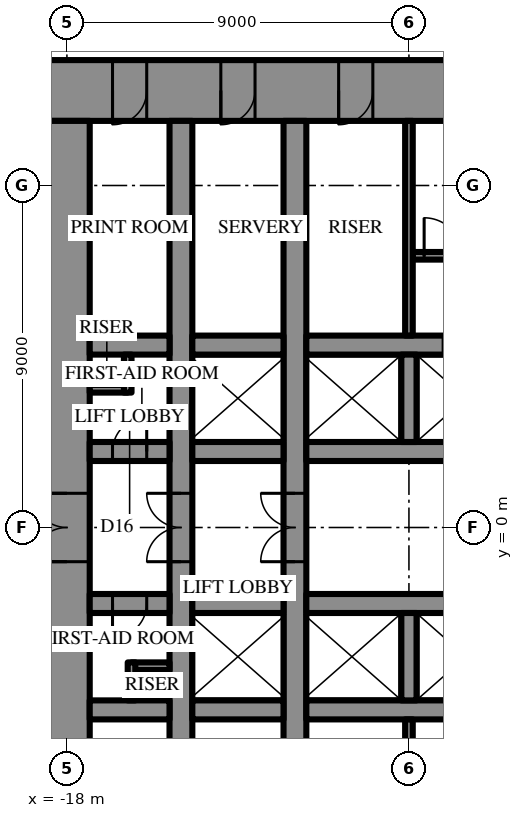
"""IFC4 building model, lengths in metres.
Left out: names, types, materials, properties, quantities, classifications, styles, units other than length and angle.
Written with IfcOpenShell. Run it as: python <this file> out.ifc"""

import sys

from ifc_helpers import new_model, si_unit, direction, frame, frame_2d, origin, place, context, subcontext, project, spatial, rectangle, extrude, element, fill, save


model = new_model("IFC4")
c1 = context("Model", 3, precision=1e-05, world=origin(), true_north=direction((0.0, 1.0)))
c2 = subcontext(c1, "Body", "Model", "MODEL_VIEW")
j1 = project(units=[si_unit("LENGTHUNIT", "METRE"), si_unit("PLANEANGLEUNIT", "RADIAN")], contexts=[c1])
p1 = place(None, origin())
s1 = spatial("IfcSite", under=j1, at=p1, CompositionType="ELEMENT")
p2 = place(p1, origin())
s2 = spatial("IfcBuilding", under=s1, at=p2, CompositionType="ELEMENT")
p3 = place(p2, frame((0.0, 0.0, 157.3)))
s3 = spatial("IfcBuildingStorey", under=s2, at=p3, CompositionType="ELEMENT", Elevation=157.3)
p4 = place(p3, frame((-18.6, 11.5, 0.0), z_axis=(0.0, 0.0, 1.0), x_axis=(1.0, 0.0, 0.0)))
e1 = element("IfcWall", 1, at=p4, inside=s3, PredefinedType="SHEAR", context=c2, shape_type="SweptSolid", body=[
    extrude(rectangle(XDim=37.2, YDim=1.6, at=frame_2d((18.6, 0.0))), origin(), (0.0, 0.0, 1.0), 4.2),
])
p5 = place(p4, frame((19.45, 0.0, 0.0)))
e2 = element("IfcOpeningElement", 2, at=p5, cuts=e1, PredefinedType="OPENING", context=c2, shape_type="SweptSolid", body=[
    extrude(rectangle(XDim=0.9, YDim=2.2, at=frame_2d((0.45, 1.1))), frame((0.0, 0.81, 0.0), z_axis=(0.0, -1.0, 0.0), x_axis=(1.0, 0.0, 0.0)), (0.0, 0.0, 1.0), 1.62),
])
p6 = place(p4, frame((22.45, 0.0, 0.0)))
e3 = element("IfcOpeningElement", 3, at=p6, cuts=e1, PredefinedType="OPENING", context=c2, shape_type="SweptSolid", body=[
    extrude(rectangle(XDim=0.9, YDim=2.2, at=frame_2d((0.45, 1.1))), frame((0.0, 0.81, 0.0), z_axis=(0.0, -1.0, 0.0), x_axis=(1.0, 0.0, 0.0)), (0.0, 0.0, 1.0), 1.62),
])
p7 = place(p4, frame((25.5, 0.0, 0.0)))
e4 = element("IfcOpeningElement", 4, at=p7, cuts=e1, PredefinedType="OPENING", context=c2, shape_type="SweptSolid", body=[
    extrude(rectangle(XDim=1.0, YDim=2.2, at=frame_2d((0.5, 1.1))), frame((0.0, 0.81, 0.0), z_axis=(0.0, -1.0, 0.0), x_axis=(1.0, 0.0, 0.0)), (0.0, 0.0, 1.0), 1.62),
])
p8 = place(p4, frame((1.8, 0.0, 0.0)))
e5 = element("IfcOpeningElement", 5, at=p8, cuts=e1, PredefinedType="OPENING", context=c2, shape_type="SweptSolid", body=[
    extrude(rectangle(XDim=0.9, YDim=2.2, at=frame_2d((0.45, 1.1))), frame((0.0, 0.81, 0.0), z_axis=(0.0, -1.0, 0.0), x_axis=(1.0, 0.0, 0.0)), (0.0, 0.0, 1.0), 1.62),
])
p9 = place(p4, frame((4.65, 0.0, 0.0)))
e6 = element("IfcOpeningElement", 6, at=p9, cuts=e1, PredefinedType="OPENING", context=c2, shape_type="SweptSolid", body=[
    extrude(rectangle(XDim=0.9, YDim=2.2, at=frame_2d((0.45, 1.1))), frame((0.0, 0.81, 0.0), z_axis=(0.0, -1.0, 0.0), x_axis=(1.0, 0.0, 0.0)), (0.0, 0.0, 1.0), 1.62),
])
p10 = place(p4, frame((7.75, 0.0, 0.0)))
e7 = element("IfcOpeningElement", 7, at=p10, cuts=e1, PredefinedType="OPENING", context=c2, shape_type="SweptSolid", body=[
    extrude(rectangle(XDim=0.9, YDim=2.2, at=frame_2d((0.45, 1.1))), frame((0.0, 0.81, 0.0), z_axis=(0.0, -1.0, 0.0), x_axis=(1.0, 0.0, 0.0)), (0.0, 0.0, 1.0), 1.62),
])
p11 = place(p4, frame((28.55, 0.0, 0.0)))
e8 = element("IfcOpeningElement", 8, at=p11, cuts=e1, PredefinedType="OPENING", context=c2, shape_type="SweptSolid", body=[
    extrude(rectangle(XDim=0.9, YDim=2.2, at=frame_2d((0.45, 1.1))), frame((0.0, 0.81, 0.0), z_axis=(0.0, -1.0, 0.0), x_axis=(1.0, 0.0, 0.0)), (0.0, 0.0, 1.0), 1.62),
])
p12 = place(p4, frame((31.65, 0.0, 0.0)))
e9 = element("IfcOpeningElement", 9, at=p12, cuts=e1, PredefinedType="OPENING", context=c2, shape_type="SweptSolid", body=[
    extrude(rectangle(XDim=0.9, YDim=2.2, at=frame_2d((0.45, 1.1))), frame((0.0, 0.81, 0.0), z_axis=(0.0, -1.0, 0.0), x_axis=(1.0, 0.0, 0.0)), (0.0, 0.0, 1.0), 1.62),
])
p13 = place(p4, frame((34.5, 0.0, 0.0)))
e10 = element("IfcOpeningElement", 10, at=p13, cuts=e1, PredefinedType="OPENING", context=c2, shape_type="SweptSolid", body=[
    extrude(rectangle(XDim=0.9, YDim=2.2, at=frame_2d((0.45, 1.1))), frame((0.0, 0.81, 0.0), z_axis=(0.0, -1.0, 0.0), x_axis=(1.0, 0.0, 0.0)), (0.0, 0.0, 1.0), 1.62),
])
p14 = place(p3, frame((-18.0, 10.7, 0.0), z_axis=(0.0, 0.0, 1.0), x_axis=(0.0, -1.0, 0.0)))
e11 = element("IfcWall", 11, at=p14, inside=s3, PredefinedType="SHEAR", context=c2, shape_type="SweptSolid", body=[
    extrude(rectangle(XDim=21.4, YDim=1.2, at=frame_2d((10.7, 0.0))), origin(), (0.0, 0.0, 1.0), 4.2),
])
p15 = place(p14, frame((9.8, 0.0, 0.0)))
e12 = element("IfcOpeningElement", 12, at=p15, cuts=e11, PredefinedType="OPENING", context=c2, shape_type="SweptSolid", body=[
    extrude(rectangle(XDim=1.8, YDim=2.4, at=frame_2d((0.9, 1.2))), frame((0.0, 0.61, 0.0), z_axis=(0.0, -1.0, 0.0), x_axis=(1.0, 0.0, 0.0)), (0.0, 0.0, 1.0), 1.22),
])
p16 = place(p3, frame((-12.0, -10.7, 0.0), z_axis=(0.0, 0.0, 1.0), x_axis=(0.0, 1.0, 0.0)))
e13 = element("IfcWall", 13, at=p16, inside=s3, PredefinedType="SHEAR", context=c2, shape_type="SweptSolid", body=[
    extrude(rectangle(XDim=21.4, YDim=0.6, at=frame_2d((10.7, 0.0))), origin(), (0.0, 0.0, 1.0), 4.2),
])
p17 = place(p16, frame((9.8, 0.0, 0.0)))
e14 = element("IfcOpeningElement", 14, at=p17, cuts=e13, PredefinedType="OPENING", context=c2, shape_type="SweptSolid", body=[
    extrude(rectangle(XDim=1.8, YDim=2.4, at=frame_2d((0.9, 1.2))), frame((0.0, 0.31, 0.0), z_axis=(0.0, -1.0, 0.0), x_axis=(1.0, 0.0, 0.0)), (0.0, 0.0, 1.0), 0.62),
])
p18 = place(p3, frame((-15.0, -10.7, 0.0), z_axis=(0.0, 0.0, 1.0), x_axis=(0.0, 1.0, 0.0)))
e15 = element("IfcWall", 15, at=p18, inside=s3, PredefinedType="SHEAR", context=c2, shape_type="SweptSolid", body=[
    extrude(rectangle(XDim=21.4, YDim=0.6, at=frame_2d((10.7, 0.0))), origin(), (0.0, 0.0, 1.0), 4.2),
])
p19 = place(p18, frame((9.8, 0.0, 0.0)))
e16 = element("IfcOpeningElement", 16, at=p19, cuts=e15, PredefinedType="OPENING", context=c2, shape_type="SweptSolid", body=[
    extrude(rectangle(XDim=1.8, YDim=2.4, at=frame_2d((0.9, 1.2))), frame((0.0, 0.31, 0.0), z_axis=(0.0, -1.0, 0.0), x_axis=(1.0, 0.0, 0.0)), (0.0, 0.0, 1.0), 0.62),
])
p20 = place(p3, frame((-17.4, 2.0, 0.0), z_axis=(0.0, 0.0, 1.0), x_axis=(1.0, 0.0, 0.0)))
e17 = element("IfcWall", 17, at=p20, inside=s3, PredefinedType="SHEAR", context=c2, shape_type="SweptSolid", body=[
    extrude(rectangle(XDim=2.1, YDim=0.5, at=frame_2d((1.05, 0.0))), origin(), (0.0, 0.0, 1.0), 4.2),
])
p21 = place(p20, frame((0.6, 0.0, 0.0)))
e18 = element("IfcOpeningElement", 18, at=p21, cuts=e17, PredefinedType="OPENING", context=c2, shape_type="SweptSolid", body=[
    extrude(rectangle(XDim=0.9, YDim=2.2, at=frame_2d((0.45, 1.1))), frame((0.0, 0.26, 0.0), z_axis=(0.0, -1.0, 0.0), x_axis=(1.0, 0.0, 0.0)), (0.0, 0.0, 1.0), 0.52),
])
p22 = place(p3, frame((-14.7, 2.0, 0.0), z_axis=(0.0, 0.0, 1.0), x_axis=(1.0, 0.0, 0.0)))
e19 = element("IfcWall", 19, at=p22, inside=s3, PredefinedType="SHEAR", context=c2, shape_type="SweptSolid", body=[
    extrude(rectangle(XDim=2.4, YDim=0.5, at=frame_2d((1.2, 0.0))), origin(), (0.0, 0.0, 1.0), 4.2),
])
p23 = place(p3, frame((-11.7, 2.0, 0.0), z_axis=(0.0, 0.0, 1.0), x_axis=(1.0, 0.0, 0.0)))
e20 = element("IfcWall", 20, at=p23, inside=s3, PredefinedType="SHEAR", context=c2, shape_type="SweptSolid", body=[
    extrude(rectangle(XDim=5.9, YDim=0.5, at=frame_2d((2.95, 0.0))), origin(), (0.0, 0.0, 1.0), 4.2),
])
p24 = place(p3, frame((-17.4, 4.8, 0.0), z_axis=(0.0, 0.0, 1.0), x_axis=(1.0, 0.0, 0.0)))
e21 = element("IfcWall", 21, at=p24, inside=s3, PredefinedType="SHEAR", context=c2, shape_type="SweptSolid", body=[
    extrude(rectangle(XDim=2.1, YDim=0.5, at=frame_2d((1.05, 0.0))), origin(), (0.0, 0.0, 1.0), 4.2),
])
p25 = place(p3, frame((-14.7, 4.8, 0.0), z_axis=(0.0, 0.0, 1.0), x_axis=(1.0, 0.0, 0.0)))
e22 = element("IfcWall", 22, at=p25, inside=s3, PredefinedType="SHEAR", context=c2, shape_type="SweptSolid", body=[
    extrude(rectangle(XDim=2.4, YDim=0.5, at=frame_2d((1.2, 0.0))), origin(), (0.0, 0.0, 1.0), 4.2),
])
p26 = place(p3, frame((-11.7, 4.8, 0.0), z_axis=(0.0, 0.0, 1.0), x_axis=(1.0, 0.0, 0.0)))
e23 = element("IfcWall", 23, at=p26, inside=s3, PredefinedType="SHEAR", context=c2, shape_type="SweptSolid", body=[
    extrude(rectangle(XDim=23.4, YDim=0.5, at=frame_2d((11.7, 0.0))), origin(), (0.0, 0.0, 1.0), 4.2),
])
p27 = place(p26, frame((6.6, 0.0, 0.0)))
e24 = element("IfcOpeningElement", 24, at=p27, cuts=e23, PredefinedType="OPENING", context=c2, shape_type="SweptSolid", body=[
    extrude(rectangle(XDim=1.2, YDim=2.2, at=frame_2d((0.6, 1.1))), frame((0.0, 0.26, 0.0), z_axis=(0.0, -1.0, 0.0), x_axis=(1.0, 0.0, 0.0)), (0.0, 0.0, 1.0), 0.52),
])
p28 = place(p26, frame((3.6, 0.0, 0.0)))
e25 = element("IfcOpeningElement", 25, at=p28, cuts=e23, PredefinedType="OPENING", context=c2, shape_type="SweptSolid", body=[
    extrude(rectangle(XDim=1.2, YDim=2.2, at=frame_2d((0.6, 1.1))), frame((0.0, 0.26, 0.0), z_axis=(0.0, -1.0, 0.0), x_axis=(1.0, 0.0, 0.0)), (0.0, 0.0, 1.0), 0.52),
])
p29 = place(p3, frame((-9.0, 2.25, 0.0), z_axis=(0.0, 0.0, 1.0), x_axis=(0.0, 1.0, 0.0)))
e26 = element("IfcWall", 26, at=p29, inside=s3, PredefinedType="SHEAR", context=c2, shape_type="SweptSolid", body=[
    extrude(rectangle(XDim=2.3, YDim=0.4, at=frame_2d((1.15, 0.0))), origin(), (0.0, 0.0, 1.0), 4.2),
])
p30 = place(p3, frame((-8.9, 7.15, 0.0), z_axis=(0.0, 0.0, 1.0), x_axis=(1.0, 0.0, 0.0)))
e27 = element("IfcWall", 27, at=p30, inside=s3, PredefinedType="SHEAR", context=c2, shape_type="SweptSolid", body=[
    extrude(rectangle(XDim=8.6, YDim=0.2, at=frame_2d((4.3, 0.0))), origin(), (0.0, 0.0, 1.0), 4.2),
])
p31 = place(p30, frame((0.3, 0.0, 0.0)))
e28 = element("IfcOpeningElement", 28, at=p31, cuts=e27, PredefinedType="OPENING", context=c2, shape_type="SweptSolid", body=[
    extrude(rectangle(XDim=1.0, YDim=2.2, at=frame_2d((0.5, 1.1))), frame((0.0, 0.11, 0.0), z_axis=(0.0, -1.0, 0.0), x_axis=(1.0, 0.0, 0.0)), (0.0, 0.0, 1.0), 0.22),
])
p32 = place(p3, frame((3.2, -2.0, 0.0), z_axis=(0.0, 0.0, 1.0), x_axis=(-1.0, 0.0, 0.0)))
e29 = element("IfcWall", 29, at=p32, inside=s3, PredefinedType="SHEAR", context=c2, shape_type="SweptSolid", body=[
    extrude(rectangle(XDim=14.9, YDim=0.5, at=frame_2d((7.45, 0.0))), origin(), (0.0, 0.0, 1.0), 4.2),
])
p33 = place(p32, frame((1.15, 0.0, 0.0)))
e30 = element("IfcOpeningElement", 30, at=p33, cuts=e29, PredefinedType="OPENING", context=c2, shape_type="SweptSolid", body=[
    extrude(rectangle(XDim=1.1, YDim=2.2, at=frame_2d((0.55, 1.1))), frame((0.0, 0.26, 0.0), z_axis=(0.0, -1.0, 0.0), x_axis=(1.0, 0.0, 0.0)), (0.0, 0.0, 1.0), 0.52),
])
p34 = place(p32, frame((4.15, 0.0, 0.0)))
e31 = element("IfcOpeningElement", 31, at=p34, cuts=e29, PredefinedType="OPENING", context=c2, shape_type="SweptSolid", body=[
    extrude(rectangle(XDim=1.1, YDim=2.2, at=frame_2d((0.55, 1.1))), frame((0.0, 0.26, 0.0), z_axis=(0.0, -1.0, 0.0), x_axis=(1.0, 0.0, 0.0)), (0.0, 0.0, 1.0), 0.52),
])
p35 = place(p32, frame((7.15, 0.0, 0.0)))
e32 = element("IfcOpeningElement", 32, at=p35, cuts=e29, PredefinedType="OPENING", context=c2, shape_type="SweptSolid", body=[
    extrude(rectangle(XDim=1.1, YDim=2.2, at=frame_2d((0.55, 1.1))), frame((0.0, 0.26, 0.0), z_axis=(0.0, -1.0, 0.0), x_axis=(1.0, 0.0, 0.0)), (0.0, 0.0, 1.0), 0.52),
])
p36 = place(p32, frame((10.15, 0.0, 0.0)))
e33 = element("IfcOpeningElement", 33, at=p36, cuts=e29, PredefinedType="OPENING", context=c2, shape_type="SweptSolid", body=[
    extrude(rectangle(XDim=1.1, YDim=2.2, at=frame_2d((0.55, 1.1))), frame((0.0, 0.26, 0.0), z_axis=(0.0, -1.0, 0.0), x_axis=(1.0, 0.0, 0.0)), (0.0, 0.0, 1.0), 0.52),
])
p37 = place(p3, frame((-12.3, -2.0, 0.0), z_axis=(0.0, 0.0, 1.0), x_axis=(-1.0, 0.0, 0.0)))
e34 = element("IfcWall", 34, at=p37, inside=s3, PredefinedType="SHEAR", context=c2, shape_type="SweptSolid", body=[
    extrude(rectangle(XDim=2.4, YDim=0.5, at=frame_2d((1.2, 0.0))), origin(), (0.0, 0.0, 1.0), 4.2),
])
p38 = place(p3, frame((-15.3, -2.0, 0.0), z_axis=(0.0, 0.0, 1.0), x_axis=(-1.0, 0.0, 0.0)))
e35 = element("IfcWall", 35, at=p38, inside=s3, PredefinedType="SHEAR", context=c2, shape_type="SweptSolid", body=[
    extrude(rectangle(XDim=2.1, YDim=0.5, at=frame_2d((1.05, 0.0))), origin(), (0.0, 0.0, 1.0), 4.2),
])
p39 = place(p38, frame((0.6, 0.0, 0.0)))
e36 = element("IfcOpeningElement", 36, at=p39, cuts=e35, PredefinedType="OPENING", context=c2, shape_type="SweptSolid", body=[
    extrude(rectangle(XDim=0.9, YDim=2.2, at=frame_2d((0.45, 1.1))), frame((0.0, 0.26, 0.0), z_axis=(0.0, -1.0, 0.0), x_axis=(1.0, 0.0, 0.0)), (0.0, 0.0, 1.0), 0.52),
])
p40 = place(p3, frame((11.7, -4.8, 0.0), z_axis=(0.0, 0.0, 1.0), x_axis=(-1.0, 0.0, 0.0)))
e37 = element("IfcWall", 37, at=p40, inside=s3, PredefinedType="SHEAR", context=c2, shape_type="SweptSolid", body=[
    extrude(rectangle(XDim=23.4, YDim=0.5, at=frame_2d((11.7, 0.0))), origin(), (0.0, 0.0, 1.0), 4.2),
])
p41 = place(p40, frame((6.6, 0.0, 0.0)))
e38 = element("IfcOpeningElement", 38, at=p41, cuts=e37, PredefinedType="OPENING", context=c2, shape_type="SweptSolid", body=[
    extrude(rectangle(XDim=1.2, YDim=2.2, at=frame_2d((0.6, 1.1))), frame((0.0, 0.26, 0.0), z_axis=(0.0, -1.0, 0.0), x_axis=(1.0, 0.0, 0.0)), (0.0, 0.0, 1.0), 0.52),
])
p42 = place(p40, frame((3.6, 0.0, 0.0)))
e39 = element("IfcOpeningElement", 39, at=p42, cuts=e37, PredefinedType="OPENING", context=c2, shape_type="SweptSolid", body=[
    extrude(rectangle(XDim=1.2, YDim=2.2, at=frame_2d((0.6, 1.1))), frame((0.0, 0.26, 0.0), z_axis=(0.0, -1.0, 0.0), x_axis=(1.0, 0.0, 0.0)), (0.0, 0.0, 1.0), 0.52),
])
p43 = place(p3, frame((-12.3, -4.8, 0.0), z_axis=(0.0, 0.0, 1.0), x_axis=(-1.0, 0.0, 0.0)))
e40 = element("IfcWall", 40, at=p43, inside=s3, PredefinedType="SHEAR", context=c2, shape_type="SweptSolid", body=[
    extrude(rectangle(XDim=2.4, YDim=0.5, at=frame_2d((1.2, 0.0))), origin(), (0.0, 0.0, 1.0), 4.2),
])
p44 = place(p3, frame((-15.3, -4.8, 0.0), z_axis=(0.0, 0.0, 1.0), x_axis=(-1.0, 0.0, 0.0)))
e41 = element("IfcWall", 41, at=p44, inside=s3, PredefinedType="SHEAR", context=c2, shape_type="SweptSolid", body=[
    extrude(rectangle(XDim=2.1, YDim=0.5, at=frame_2d((1.05, 0.0))), origin(), (0.0, 0.0, 1.0), 4.2),
])
p45 = place(p3, frame((-9.0, -2.25, 0.0), z_axis=(0.0, 0.0, 1.0), x_axis=(0.0, -1.0, 0.0)))
e42 = element("IfcWall", 42, at=p45, inside=s3, PredefinedType="SHEAR", context=c2, shape_type="SweptSolid", body=[
    extrude(rectangle(XDim=2.3, YDim=0.4, at=frame_2d((1.15, 0.0))), origin(), (0.0, 0.0, 1.0), 4.2),
])
for number, where, z_axis, x_axis in (
    (43, (-9.0, 5.05, 0.0), (0.0, 0.0, 1.0), (0.0, 1.0, 0.0)),
    (44, (-9.0, -5.05, 0.0), (0.0, 0.0, 1.0), (0.0, -1.0, 0.0)),
):
    element("IfcWall", number, at=place(p3, frame(where, z_axis=z_axis, x_axis=x_axis)), inside=s3, PredefinedType="PARTITIONING", context=c2, shape_type="SweptSolid", body=[
        extrude(rectangle(XDim=5.65, YDim=0.2, at=frame_2d((2.825, 0.0))), origin(), (0.0, 0.0, 1.0), 4.0),
    ])
for number, where, z_axis, x_axis in (
    (45, (-17.4, 3.65, 0.0), (0.0, 0.0, 1.0), (1.0, 0.0, 0.0)),
    (46, (-16.4, 3.55, 0.0), (0.0, 0.0, 1.0), (0.0, 1.0, 0.0)),
    (47, (-15.3, -3.65, 0.0), (0.0, 0.0, 1.0), (-1.0, 0.0, 0.0)),
    (48, (-16.3, -3.55, 0.0), (0.0, 0.0, 1.0), (0.0, -1.0, 0.0)),
):
    element("IfcWall", number, at=place(p3, frame(where, z_axis=z_axis, x_axis=x_axis)), inside=s3, PredefinedType="PARTITIONING", context=c2, shape_type="SweptSolid", body=[
        extrude(rectangle(XDim=1.0, YDim=0.2, at=frame_2d((0.5, 0.0))), origin(), (0.0, 0.0, 1.0), 4.0),
    ])
p46 = place(p15, frame((1.8, 0.0, 0.0), z_axis=(0.0, 0.0, 1.0), x_axis=(-1.0, 0.0, 0.0)))
e49 = element("IfcDoor", 49, at=p46, inside=s3, OperationType="DOUBLE_DOOR_SINGLE_SWING", PredefinedType="DOOR", context=c2, shape_type="SweptSolid", body=[
    extrude(rectangle(XDim=1.8, YDim=2.4, at=frame_2d((0.9, 1.2))), frame((0.0, 0.025, 0.0), z_axis=(0.0, -1.0, 0.0), x_axis=(1.0, 0.0, 0.0)), (0.0, 0.0, 1.0), 0.05),
])
fill(e12, e49)
p47 = place(p31, origin())
e50 = element("IfcDoor", 50, at=p47, inside=s3, OperationType="SINGLE_SWING_RIGHT", PredefinedType="DOOR", context=c2, shape_type="SweptSolid", body=[
    extrude(rectangle(XDim=1.0, YDim=2.2, at=frame_2d((0.5, 1.1))), frame((0.0, 0.025, 0.0), z_axis=(0.0, -1.0, 0.0), x_axis=(1.0, 0.0, 0.0)), (0.0, 0.0, 1.0), 0.05),
])
fill(e28, e50)
p48 = place(p8, frame((0.9, 0.0, 0.0), z_axis=(0.0, 0.0, 1.0), x_axis=(-1.0, 0.0, 0.0)))
e51 = element("IfcDoor", 51, at=p48, inside=s3, OperationType="SINGLE_SWING_LEFT", PredefinedType="DOOR", context=c2, shape_type="SweptSolid", body=[
    extrude(rectangle(XDim=0.9, YDim=2.2, at=frame_2d((0.45, 1.1))), frame((0.0, 0.025, 0.0), z_axis=(0.0, -1.0, 0.0), x_axis=(1.0, 0.0, 0.0)), (0.0, 0.0, 1.0), 0.05),
])
fill(e5, e51)
p49 = place(p9, frame((0.9, 0.0, 0.0), z_axis=(0.0, 0.0, 1.0), x_axis=(-1.0, 0.0, 0.0)))
e52 = element("IfcDoor", 52, at=p49, inside=s3, OperationType="SINGLE_SWING_LEFT", PredefinedType="DOOR", context=c2, shape_type="SweptSolid", body=[
    extrude(rectangle(XDim=0.9, YDim=2.2, at=frame_2d((0.45, 1.1))), frame((0.0, 0.025, 0.0), z_axis=(0.0, -1.0, 0.0), x_axis=(1.0, 0.0, 0.0)), (0.0, 0.0, 1.0), 0.05),
])
fill(e6, e52)
p50 = place(p10, frame((0.9, 0.0, 0.0), z_axis=(0.0, 0.0, 1.0), x_axis=(-1.0, 0.0, 0.0)))
e53 = element("IfcDoor", 53, at=p50, inside=s3, OperationType="SINGLE_SWING_LEFT", PredefinedType="DOOR", context=c2, shape_type="SweptSolid", body=[
    extrude(rectangle(XDim=0.9, YDim=2.2, at=frame_2d((0.45, 1.1))), frame((0.0, 0.025, 0.0), z_axis=(0.0, -1.0, 0.0), x_axis=(1.0, 0.0, 0.0)), (0.0, 0.0, 1.0), 0.05),
])
fill(e7, e53)
p51 = place(p21, origin())
e54 = element("IfcDoor", 54, at=p51, inside=s3, OperationType="SINGLE_SWING_LEFT", PredefinedType="DOOR", context=c2, shape_type="SweptSolid", body=[
    extrude(rectangle(XDim=0.9, YDim=2.2, at=frame_2d((0.45, 1.1))), frame((0.0, 0.025, 0.0), z_axis=(0.0, -1.0, 0.0), x_axis=(1.0, 0.0, 0.0)), (0.0, 0.0, 1.0), 0.05),
])
fill(e18, e54)
p52 = place(p39, origin())
e55 = element("IfcDoor", 55, at=p52, inside=s3, OperationType="SINGLE_SWING_LEFT", PredefinedType="DOOR", context=c2, shape_type="SweptSolid", body=[
    extrude(rectangle(XDim=0.9, YDim=2.2, at=frame_2d((0.45, 1.1))), frame((0.0, 0.025, 0.0), z_axis=(0.0, -1.0, 0.0), x_axis=(1.0, 0.0, 0.0)), (0.0, 0.0, 1.0), 0.05),
])
fill(e36, e55)
p53 = place(p17, origin())
e56 = element("IfcDoor", 56, at=p53, inside=s3, OperationType="DOUBLE_DOOR_SINGLE_SWING", PredefinedType="DOOR", context=c2, shape_type="SweptSolid", body=[
    extrude(rectangle(XDim=1.8, YDim=2.4, at=frame_2d((0.9, 1.2))), frame((0.0, 0.025, 0.0), z_axis=(0.0, -1.0, 0.0), x_axis=(1.0, 0.0, 0.0)), (0.0, 0.0, 1.0), 0.05),
])
fill(e14, e56)
p54 = place(p19, origin())
e57 = element("IfcDoor", 57, at=p54, inside=s3, OperationType="DOUBLE_DOOR_SINGLE_SWING", PredefinedType="DOOR", context=c2, shape_type="SweptSolid", body=[
    extrude(rectangle(XDim=1.8, YDim=2.4, at=frame_2d((0.9, 1.2))), frame((0.0, 0.025, 0.0), z_axis=(0.0, -1.0, 0.0), x_axis=(1.0, 0.0, 0.0)), (0.0, 0.0, 1.0), 0.05),
])
fill(e16, e57)
save(model, sys.argv[1])
